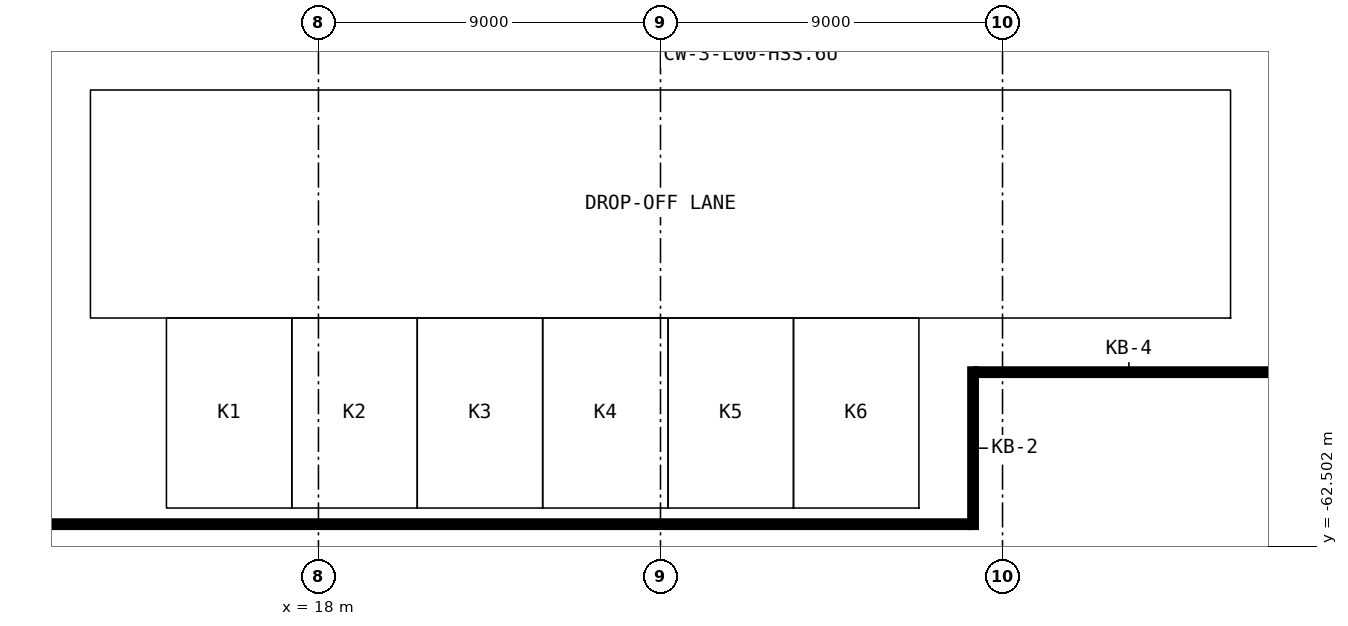
"""IFC4 building model, lengths in metres.
Left out: names, types, materials, properties, quantities, classifications, styles, units other than length and angle.
Written with IfcOpenShell. Run it as: python <this file> out.ifc"""

import sys

from ifc_helpers import new_model, si_unit, direction, frame, frame_2d, origin, place, context, subcontext, project, spatial, rectangle, extrude, element, save


model = new_model("IFC4")
c1 = context("Model", 3, precision=1e-05, world=origin(), true_north=direction((0.0, 1.0)))
c2 = subcontext(c1, "Body", "Model", "MODEL_VIEW")
j1 = project(units=[si_unit("LENGTHUNIT", "METRE"), si_unit("PLANEANGLEUNIT", "RADIAN")], contexts=[c1])
p1 = place(None, origin())
s1 = spatial("IfcSite", under=j1, at=p1, CompositionType="ELEMENT")
p2 = place(p1, origin())
s2 = spatial("IfcBuilding", under=s1, at=p2, CompositionType="ELEMENT")
p3 = place(p2, origin())
s3 = spatial("IfcBuildingStorey", under=s2, at=p3, CompositionType="ELEMENT", Elevation=0.0)
p4 = place(p3, frame((-30.35, -61.925, 0.0), z_axis=(0.0, 0.0, 1.0), x_axis=(1.0, 0.0, 0.0)))
e1 = element("IfcWall", 1, at=p4, inside=s3, PredefinedType="SOLIDWALL", context=c2, shape_type="SweptSolid", body=[
    extrude(rectangle(XDim=65.5, YDim=0.15, at=frame_2d((32.75, 0.0))), origin(), (0.0, 0.0, 1.0), 0.15),
])
p5 = place(p3, frame((35.225, -62.0, 0.0), z_axis=(0.0, 0.0, 1.0), x_axis=(0.0, 1.0, 0.0)))
e2 = element("IfcWall", 2, at=p5, inside=s3, PredefinedType="SOLIDWALL", context=c2, shape_type="SweptSolid", body=[
    extrude(rectangle(XDim=4.15, YDim=0.15, at=frame_2d((2.075, 0.0))), origin(), (0.0, 0.0, 1.0), 0.15),
])
p6 = place(p3, frame((35.3, -57.925, 0.0), z_axis=(0.0, 0.0, 1.0), x_axis=(1.0, 0.0, 0.0)))
e3 = element("IfcWall", 3, at=p6, inside=s3, PredefinedType="SOLIDWALL", context=c2, shape_type="SweptSolid", body=[
    extrude(rectangle(XDim=8.05, YDim=0.15, at=frame_2d((4.025, 0.0))), origin(), (0.0, 0.0, 1.0), 0.15),
])
save(model, sys.argv[1])
